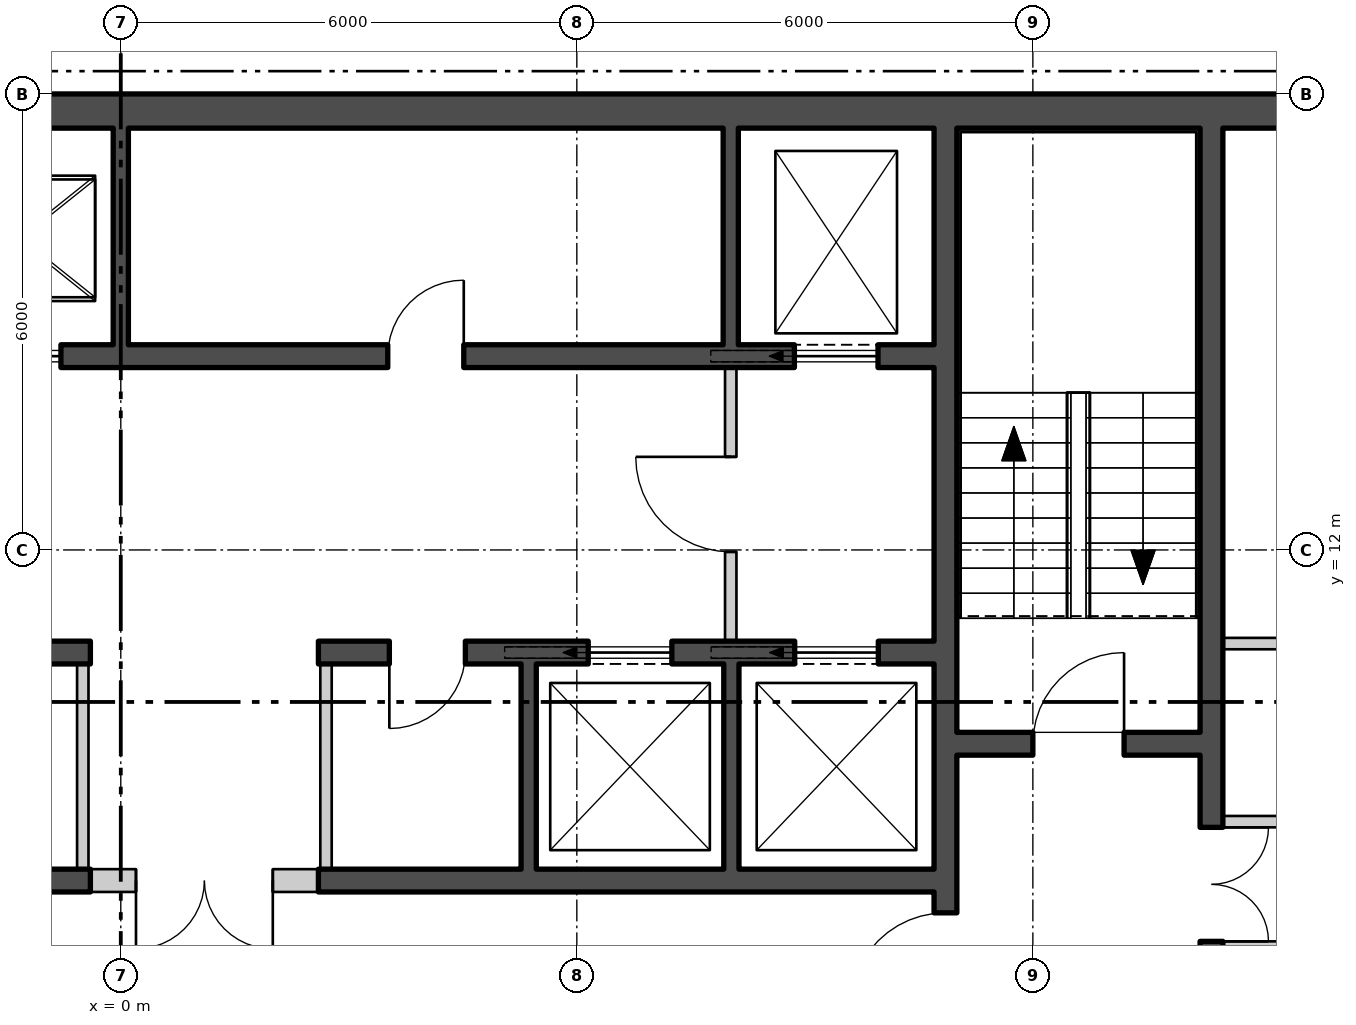
"""IFC4 building model, lengths in metres.
Left out: names, types, materials, properties, quantities, classifications, styles, units other than length and angle.
Written with IfcOpenShell. Run it as: python <this file> out.ifc"""

import sys

from ifc_helpers import new_model, si_unit, direction, frame, frame_2d, origin, place, context, subcontext, project, spatial, polyline, rectangle, outline, extrude, element, fill, save


model = new_model("IFC4")
c1 = context("Model", 3, precision=1e-05, world=origin(), true_north=direction((0.0, 1.0)))
c2 = subcontext(c1, "Body", "Model", "MODEL_VIEW")
j1 = project(units=[si_unit("LENGTHUNIT", "METRE"), si_unit("PLANEANGLEUNIT", "RADIAN")], contexts=[c1])
p1 = place(None, origin())
s1 = spatial("IfcSite", under=j1, at=p1, CompositionType="ELEMENT")
p2 = place(p1, origin())
s2 = spatial("IfcBuilding", under=s1, at=p2, CompositionType="ELEMENT")
p3 = place(p2, frame((0.0, 0.0, 239.4)))
s3 = spatial("IfcBuildingStorey", under=s2, at=p3, CompositionType="ELEMENT", Elevation=239.4)
p4 = place(p3, frame((3.105, -25.015, -0.18), z_axis=(0.0, 0.0, 1.0), x_axis=(0.499999764979, 0.866025539474, 0.0)))
e1 = element("IfcWall", 1, at=p4, inside=s3, PredefinedType="SOLIDWALL", context=c2, shape_type="SweptSolid", body=[
    extrude(outline(polyline([(-0.13, -0.225), (45.87, -0.225), (45.61, 0.225), (0.13, 0.225), (-0.13, -0.225)])), origin(), (0.0, 0.0, 1.0), 6.0),
])
p5 = place(p4, frame((1.424, 0.0, 1.38)))
e2 = element("IfcOpeningElement", 2, at=p5, cuts=e1, PredefinedType="OPENING", context=c2, shape_type="SweptSolid", body=[
    extrude(rectangle(XDim=2.4, YDim=3.6, at=frame_2d((1.2, 1.8))), frame((0.0, 0.235, 0.0), z_axis=(0.0, -1.0, 0.0), x_axis=(1.0, 0.0, 0.0)), (0.0, 0.0, 1.0), 0.47),
])
p6 = place(p4, frame((5.893, 0.0, 1.38)))
e3 = element("IfcOpeningElement", 3, at=p6, cuts=e1, PredefinedType="OPENING", context=c2, shape_type="SweptSolid", body=[
    extrude(rectangle(XDim=2.4, YDim=3.6, at=frame_2d((1.2, 1.8))), frame((0.0, 0.235, 0.0), z_axis=(0.0, -1.0, 0.0), x_axis=(1.0, 0.0, 0.0)), (0.0, 0.0, 1.0), 0.47),
])
p7 = place(p4, frame((10.401, 0.0, 1.38)))
e4 = element("IfcOpeningElement", 4, at=p7, cuts=e1, PredefinedType="OPENING", context=c2, shape_type="SweptSolid", body=[
    extrude(rectangle(XDim=2.4, YDim=3.6, at=frame_2d((1.2, 1.8))), frame((0.0, 0.235, 0.0), z_axis=(0.0, -1.0, 0.0), x_axis=(1.0, 0.0, 0.0)), (0.0, 0.0, 1.0), 0.47),
])
p8 = place(p4, frame((14.909, 0.0, 1.38)))
e5 = element("IfcOpeningElement", 5, at=p8, cuts=e1, PredefinedType="OPENING", context=c2, shape_type="SweptSolid", body=[
    extrude(rectangle(XDim=2.4, YDim=3.6, at=frame_2d((1.2, 1.8))), frame((0.0, 0.235, 0.0), z_axis=(0.0, -1.0, 0.0), x_axis=(1.0, 0.0, 0.0)), (0.0, 0.0, 1.0), 0.47),
])
p9 = place(p4, frame((19.416, 0.0, 1.38)))
e6 = element("IfcOpeningElement", 6, at=p9, cuts=e1, PredefinedType="OPENING", context=c2, shape_type="SweptSolid", body=[
    extrude(rectangle(XDim=2.4, YDim=3.6, at=frame_2d((1.2, 1.8))), frame((0.0, 0.235, 0.0), z_axis=(0.0, -1.0, 0.0), x_axis=(1.0, 0.0, 0.0)), (0.0, 0.0, 1.0), 0.47),
])
p10 = place(p4, frame((23.924, 0.0, 1.38)))
e7 = element("IfcOpeningElement", 7, at=p10, cuts=e1, PredefinedType="OPENING", context=c2, shape_type="SweptSolid", body=[
    extrude(rectangle(XDim=2.4, YDim=3.6, at=frame_2d((1.2, 1.8))), frame((0.0, 0.235, 0.0), z_axis=(0.0, -1.0, 0.0), x_axis=(1.0, 0.0, 0.0)), (0.0, 0.0, 1.0), 0.47),
])
p11 = place(p4, frame((28.431, 0.0, 1.38)))
e8 = element("IfcOpeningElement", 8, at=p11, cuts=e1, PredefinedType="OPENING", context=c2, shape_type="SweptSolid", body=[
    extrude(rectangle(XDim=2.4, YDim=3.6, at=frame_2d((1.2, 1.8))), frame((0.0, 0.235, 0.0), z_axis=(0.0, -1.0, 0.0), x_axis=(1.0, 0.0, 0.0)), (0.0, 0.0, 1.0), 0.47),
])
p12 = place(p4, frame((32.939, 0.0, 1.38)))
e9 = element("IfcOpeningElement", 9, at=p12, cuts=e1, PredefinedType="OPENING", context=c2, shape_type="SweptSolid", body=[
    extrude(rectangle(XDim=2.4, YDim=3.6, at=frame_2d((1.2, 1.8))), frame((0.0, 0.235, 0.0), z_axis=(0.0, -1.0, 0.0), x_axis=(1.0, 0.0, 0.0)), (0.0, 0.0, 1.0), 0.47),
])
p13 = place(p4, frame((37.447, 0.0, 1.38)))
e10 = element("IfcOpeningElement", 10, at=p13, cuts=e1, PredefinedType="OPENING", context=c2, shape_type="SweptSolid", body=[
    extrude(rectangle(XDim=2.4, YDim=3.6, at=frame_2d((1.2, 1.8))), frame((0.0, 0.235, 0.0), z_axis=(0.0, -1.0, 0.0), x_axis=(1.0, 0.0, 0.0)), (0.0, 0.0, 1.0), 0.47),
])
p14 = place(p4, frame((41.916, 0.0, 1.38)))
e11 = element("IfcOpeningElement", 11, at=p14, cuts=e1, PredefinedType="OPENING", context=c2, shape_type="SweptSolid", body=[
    extrude(rectangle(XDim=2.4, YDim=3.6, at=frame_2d((1.2, 1.8))), frame((0.0, 0.235, 0.0), z_axis=(0.0, -1.0, 0.0), x_axis=(1.0, 0.0, 0.0)), (0.0, 0.0, 1.0), 0.47),
])
p15 = place(p3, frame((-16.2, 17.775, 0.0), z_axis=(0.0, 0.0, 1.0), x_axis=(1.0, 0.0, 0.0)))
e12 = element("IfcWall", 12, at=p15, inside=s3, PredefinedType="SHEAR", context=c2, shape_type="SweptSolid", body=[
    extrude(rectangle(XDim=32.4, YDim=0.45, at=frame_2d((16.2, 0.0))), origin(), (0.0, 0.0, 1.0), 5.8),
])
p16 = place(p3, frame((10.85, 2.45, 0.0), z_axis=(0.0, 0.0, 1.0), x_axis=(0.0, 1.0, 0.0)))
e13 = element("IfcWall", 13, at=p16, inside=s3, PredefinedType="SHEAR", context=c2, shape_type="SweptSolid", body=[
    extrude(rectangle(XDim=15.1, YDim=0.3, at=frame_2d((7.55, 0.0))), origin(), (0.0, 0.0, 1.0), 5.8),
])
p17 = place(p16, frame((3.525, 0.0, 0.0)))
e14 = element("IfcOpeningElement", 14, at=p17, cuts=e13, PredefinedType="OPENING", context=c2, shape_type="SweptSolid", body=[
    extrude(rectangle(XDim=1.25, YDim=2.1, at=frame_2d((0.625, 1.05))), frame((0.0, 0.16, 0.0), z_axis=(0.0, -1.0, 0.0), x_axis=(1.0, 0.0, 0.0)), (0.0, 0.0, 1.0), 0.32),
])
p18 = place(p16, frame((1.15, 0.0, 0.0)))
e15 = element("IfcOpeningElement", 15, at=p18, cuts=e13, PredefinedType="OPENING", context=c2, shape_type="SweptSolid", body=[
    extrude(rectangle(XDim=1.0, YDim=2.1, at=frame_2d((0.5, 1.05))), frame((0.0, 0.16, 0.0), z_axis=(0.0, -1.0, 0.0), x_axis=(1.0, 0.0, 0.0)), (0.0, 0.0, 1.0), 0.32),
])
p19 = place(p3, frame((14.35, 2.45, 0.0), z_axis=(0.0, 0.0, 1.0), x_axis=(0.0, 1.0, 0.0)))
e16 = element("IfcWall", 16, at=p19, inside=s3, PredefinedType="SHEAR", context=c2, shape_type="SweptSolid", body=[
    extrude(rectangle(XDim=15.1, YDim=0.3, at=frame_2d((7.55, 0.0))), origin(), (0.0, 0.0, 1.0), 5.8),
])
p20 = place(p19, frame((4.4, 0.0, 0.0)))
e17 = element("IfcOpeningElement", 17, at=p20, cuts=e16, PredefinedType="OPENING", context=c2, shape_type="SweptSolid", body=[
    extrude(rectangle(XDim=1.5, YDim=2.1, at=frame_2d((0.75, 1.05))), frame((0.0, 0.16, 0.0), z_axis=(0.0, -1.0, 0.0), x_axis=(1.0, 0.0, 0.0)), (0.0, 0.0, 1.0), 0.32),
])
p21 = place(p3, frame((11.0, 9.45, 0.0), z_axis=(0.0, 0.0, 1.0), x_axis=(1.0, 0.0, 0.0)))
e18 = element("IfcWall", 18, at=p21, inside=s3, PredefinedType="SHEAR", context=c2, shape_type="SweptSolid", body=[
    extrude(rectangle(XDim=3.2, YDim=0.3, at=frame_2d((1.6, 0.0))), origin(), (0.0, 0.0, 1.0), 5.8),
])
p22 = place(p21, frame((1.0, 0.0, 0.0)))
e19 = element("IfcOpeningElement", 19, at=p22, cuts=e18, PredefinedType="OPENING", context=c2, shape_type="SweptSolid", body=[
    extrude(rectangle(XDim=1.2, YDim=2.1, at=frame_2d((0.6, 1.05))), frame((0.0, 0.16, 0.0), z_axis=(0.0, -1.0, 0.0), x_axis=(1.0, 0.0, 0.0)), (0.0, 0.0, 1.0), 0.32),
])
p23 = place(p3, frame((-10.7, 14.55, 0.0), z_axis=(0.0, 0.0, 1.0), x_axis=(1.0, 0.0, 0.0)))
e20 = element("IfcWall", 20, at=p23, inside=s3, PredefinedType="SHEAR", context=c2, shape_type="SweptSolid", body=[
    extrude(rectangle(XDim=21.4, YDim=0.3, at=frame_2d((10.7, 0.0))), origin(), (0.0, 0.0, 1.0), 5.8),
])
p24 = place(p23, frame((0.738, 0.0, 0.0)))
e21 = element("IfcOpeningElement", 21, at=p24, cuts=e20, PredefinedType="OPENING", context=c2, shape_type="SweptSolid", body=[
    extrude(rectangle(XDim=1.1, YDim=2.1, at=frame_2d((0.55, 1.05))), frame((0.0, 0.16, 0.0), z_axis=(0.0, -1.0, 0.0), x_axis=(1.0, 0.0, 0.0)), (0.0, 0.0, 1.0), 0.32),
])
p25 = place(p23, frame((3.462, 0.0, 0.0)))
e22 = element("IfcOpeningElement", 22, at=p25, cuts=e20, PredefinedType="OPENING", context=c2, shape_type="SweptSolid", body=[
    extrude(rectangle(XDim=1.1, YDim=2.1, at=frame_2d((0.55, 1.05))), frame((0.0, 0.16, 0.0), z_axis=(0.0, -1.0, 0.0), x_axis=(1.0, 0.0, 0.0)), (0.0, 0.0, 1.0), 0.32),
])
p26 = place(p23, frame((6.138, 0.0, 0.0)))
e23 = element("IfcOpeningElement", 23, at=p26, cuts=e20, PredefinedType="OPENING", context=c2, shape_type="SweptSolid", body=[
    extrude(rectangle(XDim=1.1, YDim=2.1, at=frame_2d((0.55, 1.05))), frame((0.0, 0.16, 0.0), z_axis=(0.0, -1.0, 0.0), x_axis=(1.0, 0.0, 0.0)), (0.0, 0.0, 1.0), 0.32),
])
p27 = place(p23, frame((8.812, 0.0, 0.0)))
e24 = element("IfcOpeningElement", 24, at=p27, cuts=e20, PredefinedType="OPENING", context=c2, shape_type="SweptSolid", body=[
    extrude(rectangle(XDim=1.1, YDim=2.1, at=frame_2d((0.55, 1.05))), frame((0.0, 0.16, 0.0), z_axis=(0.0, -1.0, 0.0), x_axis=(1.0, 0.0, 0.0)), (0.0, 0.0, 1.0), 0.32),
])
p28 = place(p23, frame((19.562, 0.0, 0.0)))
e25 = element("IfcOpeningElement", 25, at=p28, cuts=e20, PredefinedType="OPENING", context=c2, shape_type="SweptSolid", body=[
    extrude(rectangle(XDim=1.1, YDim=2.1, at=frame_2d((0.55, 1.05))), frame((0.0, 0.16, 0.0), z_axis=(0.0, -1.0, 0.0), x_axis=(1.0, 0.0, 0.0)), (0.0, 0.0, 1.0), 0.32),
])
p29 = place(p23, frame((14.213, 0.0, 0.0)))
e26 = element("IfcOpeningElement", 26, at=p29, cuts=e20, PredefinedType="OPENING", context=c2, shape_type="SweptSolid", body=[
    extrude(rectangle(XDim=1.0, YDim=2.1, at=frame_2d((0.5, 1.05))), frame((0.0, 0.16, 0.0), z_axis=(0.0, -1.0, 0.0), x_axis=(1.0, 0.0, 0.0)), (0.0, 0.0, 1.0), 0.32),
])
p30 = place(p3, frame((-10.7, 10.65, 0.0), z_axis=(0.0, 0.0, 1.0), x_axis=(1.0, 0.0, 0.0)))
e27 = element("IfcWall", 27, at=p30, inside=s3, PredefinedType="SHEAR", context=c2, shape_type="SweptSolid", body=[
    extrude(rectangle(XDim=10.3, YDim=0.3, at=frame_2d((5.15, 0.0))), origin(), (0.0, 0.0, 1.0), 5.8),
])
p31 = place(p30, frame((0.675, 0.0, 0.0)))
e28 = element("IfcOpeningElement", 28, at=p31, cuts=e27, PredefinedType="OPENING", context=c2, shape_type="SweptSolid", body=[
    extrude(rectangle(XDim=1.1, YDim=2.1, at=frame_2d((0.55, 1.05))), frame((0.0, 0.16, 0.0), z_axis=(0.0, -1.0, 0.0), x_axis=(1.0, 0.0, 0.0)), (0.0, 0.0, 1.0), 0.32),
])
p32 = place(p30, frame((3.275, 0.0, 0.0)))
e29 = element("IfcOpeningElement", 29, at=p32, cuts=e27, PredefinedType="OPENING", context=c2, shape_type="SweptSolid", body=[
    extrude(rectangle(XDim=1.1, YDim=2.1, at=frame_2d((0.55, 1.05))), frame((0.0, 0.16, 0.0), z_axis=(0.0, -1.0, 0.0), x_axis=(1.0, 0.0, 0.0)), (0.0, 0.0, 1.0), 0.32),
])
p33 = place(p30, frame((5.825, 0.0, 0.0)))
e30 = element("IfcOpeningElement", 30, at=p33, cuts=e27, PredefinedType="OPENING", context=c2, shape_type="SweptSolid", body=[
    extrude(rectangle(XDim=1.1, YDim=2.1, at=frame_2d((0.55, 1.05))), frame((0.0, 0.16, 0.0), z_axis=(0.0, -1.0, 0.0), x_axis=(1.0, 0.0, 0.0)), (0.0, 0.0, 1.0), 0.32),
])
p34 = place(p30, frame((8.425, 0.0, 0.0)))
e31 = element("IfcOpeningElement", 31, at=p34, cuts=e27, PredefinedType="OPENING", context=c2, shape_type="SweptSolid", body=[
    extrude(rectangle(XDim=1.0, YDim=2.1, at=frame_2d((0.5, 1.05))), frame((0.0, 0.16, 0.0), z_axis=(0.0, -1.0, 0.0), x_axis=(1.0, 0.0, 0.0)), (0.0, 0.0, 1.0), 0.32),
])
p35 = place(p3, frame((-10.7, 7.65, 0.0), z_axis=(0.0, 0.0, 1.0), x_axis=(1.0, 0.0, 0.0)))
e32 = element("IfcWall", 32, at=p35, inside=s3, PredefinedType="SHEAR", context=c2, shape_type="SweptSolid", body=[
    extrude(rectangle(XDim=10.3, YDim=0.3, at=frame_2d((5.15, 0.0))), origin(), (0.0, 0.0, 1.0), 5.8),
])
p36 = place(p3, frame((2.6, 10.65, 0.0), z_axis=(0.0, 0.0, 1.0), x_axis=(1.0, 0.0, 0.0)))
e33 = element("IfcWall", 33, at=p36, inside=s3, PredefinedType="SHEAR", context=c2, shape_type="SweptSolid", body=[
    extrude(rectangle(XDim=8.1, YDim=0.3, at=frame_2d((4.05, 0.0))), origin(), (0.0, 0.0, 1.0), 5.8),
])
p37 = place(p36, frame((3.55, 0.0, 0.0)))
e34 = element("IfcOpeningElement", 34, at=p37, cuts=e33, PredefinedType="OPENING", context=c2, shape_type="SweptSolid", body=[
    extrude(rectangle(XDim=1.1, YDim=2.1, at=frame_2d((0.55, 1.05))), frame((0.0, 0.16, 0.0), z_axis=(0.0, -1.0, 0.0), x_axis=(1.0, 0.0, 0.0)), (0.0, 0.0, 1.0), 0.32),
])
p38 = place(p36, frame((6.267, 0.0, 0.0)))
e35 = element("IfcOpeningElement", 35, at=p38, cuts=e33, PredefinedType="OPENING", context=c2, shape_type="SweptSolid", body=[
    extrude(rectangle(XDim=1.1, YDim=2.1, at=frame_2d((0.55, 1.05))), frame((0.0, 0.16, 0.0), z_axis=(0.0, -1.0, 0.0), x_axis=(1.0, 0.0, 0.0)), (0.0, 0.0, 1.0), 0.32),
])
p39 = place(p36, frame((0.933, 0.0, 0.0)))
e36 = element("IfcOpeningElement", 36, at=p39, cuts=e33, PredefinedType="OPENING", context=c2, shape_type="SweptSolid", body=[
    extrude(rectangle(XDim=1.0, YDim=2.1, at=frame_2d((0.5, 1.05))), frame((0.0, 0.16, 0.0), z_axis=(0.0, -1.0, 0.0), x_axis=(1.0, 0.0, 0.0)), (0.0, 0.0, 1.0), 0.32),
])
p40 = place(p3, frame((2.6, 7.65, 0.0), z_axis=(0.0, 0.0, 1.0), x_axis=(1.0, 0.0, 0.0)))
e37 = element("IfcWall", 37, at=p40, inside=s3, PredefinedType="SHEAR", context=c2, shape_type="SweptSolid", body=[
    extrude(rectangle(XDim=8.1, YDim=0.3, at=frame_2d((4.05, 0.0))), origin(), (0.0, 0.0, 1.0), 5.8),
])
for number, where, z_axis, x_axis in (
    (38, (0.0, 14.7, 0.0), (0.0, 0.0, 1.0), (0.0, 1.0, 0.0)),
    (39, (8.025, 14.7, 0.0), (0.0, 0.0, 1.0), (0.0, 1.0, 0.0)),
):
    element("IfcWall", number, at=place(p3, frame(where, z_axis=z_axis, x_axis=x_axis)), inside=s3, PredefinedType="SHEAR", context=c2, shape_type="SweptSolid", body=[
        extrude(rectangle(XDim=2.85, YDim=0.2, at=frame_2d((1.425, 0.0))), origin(), (0.0, 0.0, 1.0), 5.8),
    ])
for number, where, z_axis, x_axis in (
    (40, (-0.5, 7.8, 0.0), (0.0, 0.0, 1.0), (0.0, 1.0, 0.0)),
    (41, (2.7, 7.8, 0.0), (0.0, 0.0, 1.0), (0.0, 1.0, 0.0)),
):
    element("IfcWall", number, at=place(p3, frame(where, z_axis=z_axis, x_axis=x_axis)), inside=s3, PredefinedType="PARTITIONING", context=c2, shape_type="SweptSolid", body=[
        extrude(rectangle(XDim=2.7, YDim=0.15, at=frame_2d((1.35, 0.0))), origin(), (0.0, 0.0, 1.0), 5.8),
    ])
for number, where, z_axis, x_axis in (
    (42, (5.367, 7.8, 0.0), (0.0, 0.0, 1.0), (0.0, 1.0, 0.0)),
    (43, (8.033, 7.8, 0.0), (0.0, 0.0, 1.0), (0.0, 1.0, 0.0)),
):
    element("IfcWall", number, at=place(p3, frame(where, z_axis=z_axis, x_axis=x_axis)), inside=s3, PredefinedType="SHEAR", context=c2, shape_type="SweptSolid", body=[
        extrude(rectangle(XDim=2.7, YDim=0.2, at=frame_2d((1.35, 0.0))), origin(), (0.0, 0.0, 1.0), 5.8),
    ])
p41 = place(p3, frame((8.025, 10.8, 0.0), z_axis=(0.0, 0.0, 1.0), x_axis=(0.0, 1.0, 0.0)))
e44 = element("IfcWall", 44, at=p41, inside=s3, PredefinedType="PARTITIONING", context=c2, shape_type="SweptSolid", body=[
    extrude(rectangle(XDim=3.6, YDim=0.15, at=frame_2d((1.8, 0.0))), origin(), (0.0, 0.0, 1.0), 5.8),
])
p42 = place(p41, frame((1.175, 0.0, 0.0)))
e45 = element("IfcOpeningElement", 45, at=p42, cuts=e44, PredefinedType="OPENING", context=c2, shape_type="SweptSolid", body=[
    extrude(rectangle(XDim=1.25, YDim=2.1, at=frame_2d((0.625, 1.05))), frame((0.0, 0.085, 0.0), z_axis=(0.0, -1.0, 0.0), x_axis=(1.0, 0.0, 0.0)), (0.0, 0.0, 1.0), 0.17),
])
for number, where, z_axis, x_axis in (
    (46, (14.5, 6.775, 0.0), (0.0, 0.0, 1.0), (1.0, 0.0, 0.0)),
    (47, (14.5, 8.425, 0.0), (0.0, 0.0, 1.0), (1.0, 0.0, 0.0)),
    (48, (14.5, 10.768, 0.0), (0.0, 0.0, 1.0), (1.0, 0.0, 0.0)),
):
    element("IfcWall", number, at=place(p3, frame(where, z_axis=z_axis, x_axis=x_axis)), inside=s3, PredefinedType="PARTITIONING", context=c2, shape_type="SweptSolid", body=[
        extrude(rectangle(XDim=1.25, YDim=0.15, at=frame_2d((0.625, 0.0))), origin(), (0.0, 0.0, 1.0), 5.8),
    ])
p43 = place(p3, frame((-0.4, 7.65, 0.0), z_axis=(0.0, 0.0, 1.0), x_axis=(1.0, 0.0, 0.0)))
e49 = element("IfcWall", 49, at=p43, inside=s3, PredefinedType="PARTITIONING", context=c2, shape_type="SweptSolid", body=[
    extrude(rectangle(XDim=3.0, YDim=0.3, at=frame_2d((1.5, 0.0))), origin(), (0.0, 0.0, 1.0), 5.8),
])
p44 = place(p43, frame((0.6, 0.0, 0.0)))
e50 = element("IfcOpeningElement", 50, at=p44, cuts=e49, PredefinedType="OPENING", context=c2, shape_type="SweptSolid", body=[
    extrude(rectangle(XDim=1.8, YDim=2.4, at=frame_2d((0.9, 1.2))), frame((0.0, 0.16, 0.0), z_axis=(0.0, -1.0, 0.0), x_axis=(1.0, 0.0, 0.0)), (0.0, 0.0, 1.0), 0.32),
])
p45 = place(p27, origin())
e51 = element("IfcDoor", 51, at=p45, inside=s3, OperationType="SLIDING_TO_LEFT", PredefinedType="DOOR", context=c2, shape_type="SweptSolid", body=[
    extrude(rectangle(XDim=1.1, YDim=2.1, at=frame_2d((0.55, 1.05))), frame((0.0, 0.025, 0.0), z_axis=(0.0, -1.0, 0.0), x_axis=(1.0, 0.0, 0.0)), (0.0, 0.0, 1.0), 0.05),
])
fill(e24, e51)
p46 = place(p28, origin())
e52 = element("IfcDoor", 52, at=p46, inside=s3, OperationType="SLIDING_TO_LEFT", PredefinedType="DOOR", context=c2, shape_type="SweptSolid", body=[
    extrude(rectangle(XDim=1.1, YDim=2.1, at=frame_2d((0.55, 1.05))), frame((0.0, 0.025, 0.0), z_axis=(0.0, -1.0, 0.0), x_axis=(1.0, 0.0, 0.0)), (0.0, 0.0, 1.0), 0.05),
])
fill(e25, e52)
p47 = place(p37, origin())
e53 = element("IfcDoor", 53, at=p47, inside=s3, OperationType="SLIDING_TO_LEFT", PredefinedType="DOOR", context=c2, shape_type="SweptSolid", body=[
    extrude(rectangle(XDim=1.1, YDim=2.1, at=frame_2d((0.55, 1.05))), frame((0.0, 0.025, 0.0), z_axis=(0.0, -1.0, 0.0), x_axis=(1.0, 0.0, 0.0)), (0.0, 0.0, 1.0), 0.05),
])
fill(e34, e53)
p48 = place(p38, origin())
e54 = element("IfcDoor", 54, at=p48, inside=s3, OperationType="SLIDING_TO_LEFT", PredefinedType="DOOR", context=c2, shape_type="SweptSolid", body=[
    extrude(rectangle(XDim=1.1, YDim=2.1, at=frame_2d((0.55, 1.05))), frame((0.0, 0.025, 0.0), z_axis=(0.0, -1.0, 0.0), x_axis=(1.0, 0.0, 0.0)), (0.0, 0.0, 1.0), 0.05),
])
fill(e35, e54)
p49 = place(p29, origin())
e55 = element("IfcDoor", 55, at=p49, inside=s3, OperationType="SINGLE_SWING_LEFT", PredefinedType="DOOR", context=c2, shape_type="SweptSolid", body=[
    extrude(rectangle(XDim=1.0, YDim=2.1, at=frame_2d((0.5, 1.05))), frame((0.0, 0.025, 0.0), z_axis=(0.0, -1.0, 0.0), x_axis=(1.0, 0.0, 0.0)), (0.0, 0.0, 1.0), 0.05),
])
fill(e26, e55)
p50 = place(p39, origin())
e56 = element("IfcDoor", 56, at=p50, inside=s3, OperationType="SINGLE_SWING_LEFT", PredefinedType="DOOR", context=c2, shape_type="SweptSolid", body=[
    extrude(rectangle(XDim=1.0, YDim=2.1, at=frame_2d((0.5, 1.05))), frame((0.0, 0.025, 0.0), z_axis=(0.0, -1.0, 0.0), x_axis=(1.0, 0.0, 0.0)), (0.0, 0.0, 1.0), 0.05),
])
fill(e36, e56)
p51 = place(p42, origin())
e57 = element("IfcDoor", 57, at=p51, inside=s3, OperationType="SINGLE_SWING_LEFT", PredefinedType="DOOR", context=c2, shape_type="SweptSolid", body=[
    extrude(rectangle(XDim=1.25, YDim=2.1, at=frame_2d((0.625, 1.05))), frame((0.0, 0.025, 0.0), z_axis=(0.0, -1.0, 0.0), x_axis=(1.0, 0.0, 0.0)), (0.0, 0.0, 1.0), 0.05),
])
fill(e45, e57)
p52 = place(p22, origin())
e58 = element("IfcDoor", 58, at=p52, inside=s3, OperationType="SINGLE_SWING_LEFT", PredefinedType="DOOR", context=c2, shape_type="SweptSolid", body=[
    extrude(rectangle(XDim=1.2, YDim=2.1, at=frame_2d((0.6, 1.05))), frame((0.0, 0.025, 0.0), z_axis=(0.0, -1.0, 0.0), x_axis=(1.0, 0.0, 0.0)), (0.0, 0.0, 1.0), 0.05),
])
fill(e19, e58)
p53 = place(p17, origin())
e59 = element("IfcDoor", 59, at=p53, inside=s3, OperationType="SINGLE_SWING_RIGHT", PredefinedType="DOOR", context=c2, shape_type="SweptSolid", body=[
    extrude(rectangle(XDim=1.25, YDim=2.1, at=frame_2d((0.625, 1.05))), frame((0.0, 0.025, 0.0), z_axis=(0.0, -1.0, 0.0), x_axis=(1.0, 0.0, 0.0)), (0.0, 0.0, 1.0), 0.05),
])
fill(e14, e59)
p54 = place(p20, origin())
e60 = element("IfcDoor", 60, at=p54, inside=s3, OperationType="DOUBLE_DOOR_SINGLE_SWING", PredefinedType="DOOR", context=c2, shape_type="SweptSolid", body=[
    extrude(rectangle(XDim=1.5, YDim=2.1, at=frame_2d((0.75, 1.05))), frame((0.0, 0.025, 0.0), z_axis=(0.0, -1.0, 0.0), x_axis=(1.0, 0.0, 0.0)), (0.0, 0.0, 1.0), 0.05),
])
fill(e17, e60)
p55 = place(p44, origin())
e61 = element("IfcDoor", 61, at=p55, inside=s3, OperationType="DOUBLE_DOOR_SINGLE_SWING", PredefinedType="DOOR", context=c2, shape_type="SweptSolid", body=[
    extrude(rectangle(XDim=1.8, YDim=2.4, at=frame_2d((0.9, 1.2))), frame((0.0, 0.025, 0.0), z_axis=(0.0, -1.0, 0.0), x_axis=(1.0, 0.0, 0.0)), (0.0, 0.0, 1.0), 0.05),
])
fill(e50, e61)
save(model, sys.argv[1])
